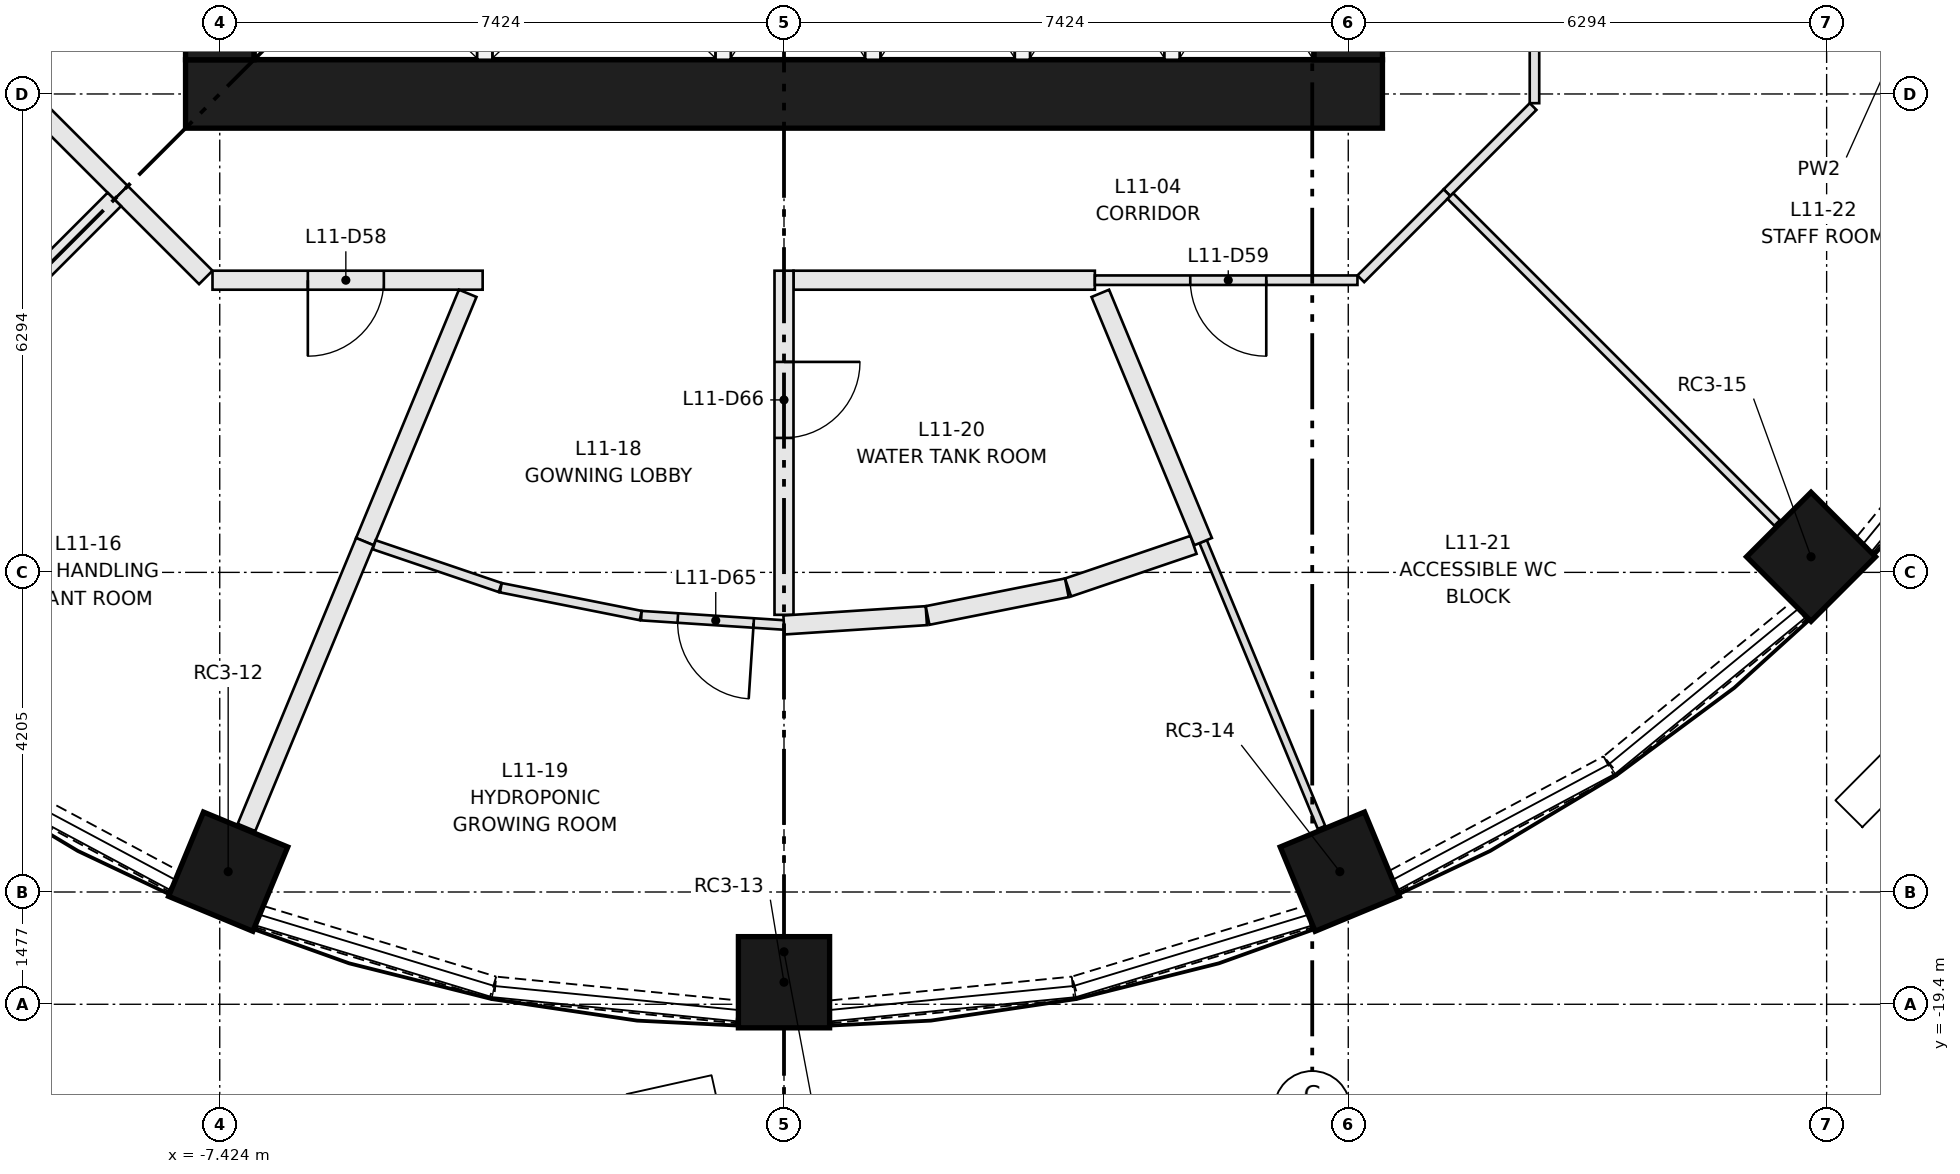
"""IFC4 building model, lengths in metres.
Left out: names, types, materials, properties, quantities, classifications, styles, units other than length and angle.
Written with IfcOpenShell. Run it as: python <this file> out.ifc"""

import sys

from ifc_helpers import new_model, si_unit, direction, frame, frame_2d, origin, origin_2d, place, context, subcontext, project, spatial, rectangle, extrude, element, fill, save


model = new_model("IFC4")
c1 = context("Model", 3, precision=1e-05, world=origin(), true_north=direction((0.0, 1.0)))
c2 = subcontext(c1, "Body", "Model", "MODEL_VIEW")
j1 = project(units=[si_unit("LENGTHUNIT", "METRE"), si_unit("PLANEANGLEUNIT", "RADIAN")], contexts=[c1])
p1 = place(None, origin())
s1 = spatial("IfcSite", under=j1, at=p1, CompositionType="ELEMENT")
p2 = place(p1, origin())
s2 = spatial("IfcBuilding", under=s1, at=p2, CompositionType="ELEMENT")
p3 = place(p2, frame((0.0, 0.0, 44.45)))
s3 = spatial("IfcBuildingStorey", under=s2, at=p3, CompositionType="ELEMENT", Elevation=44.45)
for number, where, z_axis, x_axis in (
    (1, (-7.313, -17.655, 0.0), (0.0, 0.0, 1.0), (-0.383, -0.924, 0.0)),
    (2, (0.0, -19.11, 0.0), (0.0, 0.0, 1.0), (0.0, -1.0, 0.0)),
    (3, (7.313, -17.655, 0.0), (0.0, 0.0, 1.0), (0.383, -0.924, 0.0)),
    (4, (13.513, -13.513, 0.0), (0.0, 0.0, 1.0), (0.707, -0.707, 0.0)),
):
    element("IfcColumn", number, at=place(p3, frame(where, z_axis=z_axis, x_axis=x_axis)), inside=s3, PredefinedType="COLUMN", context=c2, shape_type="SweptSolid", body=[
        extrude(rectangle(XDim=1.2, YDim=1.2, at=origin_2d()), origin(), (0.0, 0.0, 1.0), 3.65),
    ])
p4 = place(p3, frame((-7.874, -7.424, 0.0), z_axis=(0.0, 0.0, 1.0), x_axis=(1.0, 0.0, 0.0)))
e5 = element("IfcWall", 5, at=p4, inside=s3, PredefinedType="SHEAR", context=c2, shape_type="SweptSolid", body=[
    extrude(rectangle(XDim=15.748, YDim=0.9, at=frame_2d((7.874, 0.0))), origin(), (0.0, 0.0, 1.0), 3.65),
])
p5 = place(p3, frame((-7.424, -6.974, 0.0), z_axis=(0.0, 0.0, 1.0), x_axis=(0.0, 1.0, 0.0)))
e6 = element("IfcWall", 6, at=p5, inside=s3, PredefinedType="SHEAR", context=c2, shape_type="SweptSolid", body=[
    extrude(rectangle(XDim=13.948, YDim=0.9, at=frame_2d((6.974, 0.0))), origin(), (0.0, 0.0, 1.0), 3.65),
])
p6 = place(p5, frame((6.474, 0.0, 0.0)))
e7 = element("IfcOpeningElement", 7, at=p6, cuts=e6, PredefinedType="OPENING", context=c2, shape_type="SweptSolid", body=[
    extrude(rectangle(XDim=1.0, YDim=2.1, at=frame_2d((0.5, 1.05))), frame((0.0, 0.46, 0.0), z_axis=(0.0, -1.0, 0.0), x_axis=(1.0, 0.0, 0.0)), (0.0, 0.0, 1.0), 0.92),
])
p7 = place(p5, frame((3.35, 0.0, 0.0)))
e8 = element("IfcOpeningElement", 8, at=p7, cuts=e6, PredefinedType="OPENING", context=c2, shape_type="SweptSolid", body=[
    extrude(rectangle(XDim=1.8, YDim=2.1, at=frame_2d((0.9, 1.05))), frame((0.0, 0.46, 0.0), z_axis=(0.0, -1.0, 0.0), x_axis=(1.0, 0.0, 0.0)), (0.0, 0.0, 1.0), 0.92),
])
p8 = place(p5, frame((8.799, 0.0, 0.0)))
e9 = element("IfcOpeningElement", 9, at=p8, cuts=e6, PredefinedType="OPENING", context=c2, shape_type="SweptSolid", body=[
    extrude(rectangle(XDim=1.8, YDim=2.1, at=frame_2d((0.9, 1.05))), frame((0.0, 0.46, 0.0), z_axis=(0.0, -1.0, 0.0), x_axis=(1.0, 0.0, 0.0)), (0.0, 0.0, 1.0), 0.92),
])
p9 = place(p5, frame((11.974, 0.0, 0.0)))
e10 = element("IfcOpeningElement", 10, at=p9, cuts=e6, PredefinedType="OPENING", context=c2, shape_type="SweptSolid", body=[
    extrude(rectangle(XDim=1.0, YDim=2.1, at=frame_2d((0.5, 1.05))), frame((0.0, 0.46, 0.0), z_axis=(0.0, -1.0, 0.0), x_axis=(1.0, 0.0, 0.0)), (0.0, 0.0, 1.0), 0.92),
])
p10 = place(p3, frame((7.424, -6.974, 0.0), z_axis=(0.0, 0.0, 1.0), x_axis=(0.0, 1.0, 0.0)))
e11 = element("IfcWall", 11, at=p10, inside=s3, PredefinedType="SHEAR", context=c2, shape_type="SweptSolid", body=[
    extrude(rectangle(XDim=13.948, YDim=0.9, at=frame_2d((6.974, 0.0))), origin(), (0.0, 0.0, 1.0), 3.65),
])
p11 = place(p10, frame((6.474, 0.0, 0.0)))
e12 = element("IfcOpeningElement", 12, at=p11, cuts=e11, PredefinedType="OPENING", context=c2, shape_type="SweptSolid", body=[
    extrude(rectangle(XDim=1.0, YDim=2.1, at=frame_2d((0.5, 1.05))), frame((0.0, 0.46, 0.0), z_axis=(0.0, -1.0, 0.0), x_axis=(1.0, 0.0, 0.0)), (0.0, 0.0, 1.0), 0.92),
])
p12 = place(p10, frame((3.35, 0.0, 0.0)))
e13 = element("IfcOpeningElement", 13, at=p12, cuts=e11, PredefinedType="OPENING", context=c2, shape_type="SweptSolid", body=[
    extrude(rectangle(XDim=1.8, YDim=2.1, at=frame_2d((0.9, 1.05))), frame((0.0, 0.46, 0.0), z_axis=(0.0, -1.0, 0.0), x_axis=(1.0, 0.0, 0.0)), (0.0, 0.0, 1.0), 0.92),
])
p13 = place(p10, frame((8.799, 0.0, 0.0)))
e14 = element("IfcOpeningElement", 14, at=p13, cuts=e11, PredefinedType="OPENING", context=c2, shape_type="SweptSolid", body=[
    extrude(rectangle(XDim=1.8, YDim=2.1, at=frame_2d((0.9, 1.05))), frame((0.0, 0.46, 0.0), z_axis=(0.0, -1.0, 0.0), x_axis=(1.0, 0.0, 0.0)), (0.0, 0.0, 1.0), 0.92),
])
for number, where, z_axis, x_axis in (
    (15, (-3.937, -6.974, 0.0), (0.0, 0.0, 1.0), (0.0, 1.0, 0.0)),
    (16, (-0.8, -6.974, 0.0), (0.0, 0.0, 1.0), (0.0, 1.0, 0.0)),
    (17, (1.168, -6.974, 0.0), (0.0, 0.0, 1.0), (0.0, 1.0, 0.0)),
    (18, (3.137, -6.974, 0.0), (0.0, 0.0, 1.0), (0.0, 1.0, 0.0)),
    (19, (5.105, -6.974, 0.0), (0.0, 0.0, 1.0), (0.0, 1.0, 0.0)),
):
    element("IfcWall", number, at=place(p3, frame(where, z_axis=z_axis, x_axis=x_axis)), inside=s3, PredefinedType="PARTITIONING", context=c2, shape_type="SweptSolid", body=[
        extrude(rectangle(XDim=2.8, YDim=0.2, at=frame_2d((1.4, 0.0))), origin(), (0.0, 0.0, 1.0), 3.3),
    ])
p14 = place(p3, frame((-10.854, -16.27, 0.0), z_axis=(0.0, 0.0, 1.0), x_axis=(0.881981372243, -0.471284265614, 0.0)))
e20 = element("IfcWall", 20, at=p14, inside=s3, PredefinedType="SOLIDWALL", context=c2, shape_type="SweptSolid", body=[
    extrude(rectangle(XDim=3.204, YDim=0.3, at=frame_2d((1.602, 0.0))), origin(), (0.0, 0.0, 1.0), 0.9),
])
p15 = place(p3, frame((-6.895, -18.25, 0.0), z_axis=(0.0, 0.0, 1.0), x_axis=(0.956883225512, -0.290472877795, 0.0)))
e21 = element("IfcWall", 21, at=p15, inside=s3, PredefinedType="SOLIDWALL", context=c2, shape_type="SweptSolid", body=[
    extrude(rectangle(XDim=3.202, YDim=0.3, at=frame_2d((1.601, 0.0))), origin(), (0.0, 0.0, 1.0), 0.9),
])
for number, where, z_axis, x_axis in (
    (22, (-3.801, -19.186, 0.0), (0.0, 0.0, 1.0), (0.995, -0.098, 0.0)),
    (23, (0.613, -19.5, 0.0), (0.0, 0.0, 1.0), (0.995, 0.098, 0.0)),
):
    element("IfcWall", number, at=place(p3, frame(where, z_axis=z_axis, x_axis=x_axis)), inside=s3, PredefinedType="SOLIDWALL", context=c2, shape_type="SweptSolid", body=[
        extrude(rectangle(XDim=3.204, YDim=0.3, at=frame_2d((1.602, 0.0))), origin(), (0.0, 0.0, 1.0), 0.9),
    ])
p16 = place(p3, frame((3.83, -19.18, 0.0), z_axis=(0.0, 0.0, 1.0), x_axis=(0.956883225512, 0.290472877795, 0.0)))
e24 = element("IfcWall", 24, at=p16, inside=s3, PredefinedType="SOLIDWALL", context=c2, shape_type="SweptSolid", body=[
    extrude(rectangle(XDim=3.202, YDim=0.3, at=frame_2d((1.601, 0.0))), origin(), (0.0, 0.0, 1.0), 0.9),
])
p17 = place(p3, frame((8.028, -17.78, 0.0), z_axis=(0.0, 0.0, 1.0), x_axis=(0.881981372243, 0.471284265614, 0.0)))
e25 = element("IfcWall", 25, at=p17, inside=s3, PredefinedType="SOLIDWALL", context=c2, shape_type="SweptSolid", body=[
    extrude(rectangle(XDim=3.204, YDim=0.3, at=frame_2d((1.602, 0.0))), origin(), (0.0, 0.0, 1.0), 0.9),
])
for number, where, z_axis, x_axis in (
    (26, (10.879, -16.253, 0.0), (0.0, 0.0, 1.0), (0.773, 0.634, 0.0)),
    (27, (14.222, -13.354, 0.0), (0.0, 0.0, 1.0), (0.634, 0.773, 0.0)),
):
    element("IfcWall", number, at=place(p3, frame(where, z_axis=z_axis, x_axis=x_axis)), inside=s3, PredefinedType="SOLIDWALL", context=c2, shape_type="SweptSolid", body=[
        extrude(rectangle(XDim=3.202, YDim=0.3, at=frame_2d((1.601, 0.0))), origin(), (0.0, 0.0, 1.0), 0.9),
    ])
p18 = place(p3, frame((9.856, -7.589, 0.0), z_axis=(0.0, 0.0, 1.0), x_axis=(-0.70718294931, -0.707030604857, 0.0)))
e28 = element("IfcWall", 28, at=p18, inside=s3, PredefinedType="PARTITIONING", context=c2, shape_type="SweptSolid", body=[
    extrude(rectangle(XDim=1.603, YDim=0.125, at=frame_2d((0.801, 0.0))), origin(), (0.0, 0.0, 1.0), 3.3),
])
p19 = place(p3, frame((9.874, -4.09, 0.0), z_axis=(0.0, 0.0, 1.0), x_axis=(0.0, -1.0, 0.0)))
e29 = element("IfcWall", 29, at=p19, inside=s3, PredefinedType="PARTITIONING", context=c2, shape_type="SweptSolid", body=[
    extrude(rectangle(XDim=3.455, YDim=0.125, at=frame_2d((1.728, 0.0))), origin(), (0.0, 0.0, 1.0), 3.3),
])
p20 = place(p19, frame((1.2, 0.0, 0.0)))
e30 = element("IfcOpeningElement", 30, at=p20, cuts=e29, PredefinedType="OPENING", context=c2, shape_type="SweptSolid", body=[
    extrude(rectangle(XDim=1.0, YDim=2.1, at=frame_2d((0.5, 1.05))), frame((0.0, 0.073, 0.0), z_axis=(0.0, -1.0, 0.0), x_axis=(1.0, 0.0, 0.0)), (0.0, 0.0, 1.0), 0.145),
])
for number, where, z_axis, x_axis in (
    (31, (-8.722, -8.722, 0.0), (0.0, 0.0, 1.0), (-0.707, 0.707, 0.0)),
    (32, (-7.608, -9.837, 0.0), (0.0, 0.0, 1.0), (-0.707, 0.707, 0.0)),
):
    element("IfcWall", number, at=place(p3, frame(where, z_axis=z_axis, x_axis=x_axis)), inside=s3, PredefinedType="PARTITIONING", context=c2, shape_type="SweptSolid", body=[
        extrude(rectangle(XDim=1.577, YDim=0.25, at=frame_2d((0.788, 0.0))), origin(), (0.0, 0.0, 1.0), 3.3),
    ])
p21 = place(p3, frame((-3.965, -9.874, 0.0), z_axis=(0.0, 0.0, 1.0), x_axis=(-1.0, 0.0, 0.0)))
e33 = element("IfcWall", 33, at=p21, inside=s3, PredefinedType="PARTITIONING", context=c2, shape_type="SweptSolid", body=[
    extrude(rectangle(XDim=3.554, YDim=0.25, at=frame_2d((1.777, 0.0))), origin(), (0.0, 0.0, 1.0), 3.3),
])
p22 = place(p21, frame((1.3, 0.0, 0.0)))
e34 = element("IfcOpeningElement", 34, at=p22, cuts=e33, PredefinedType="OPENING", context=c2, shape_type="SweptSolid", body=[
    extrude(rectangle(XDim=1.0, YDim=2.1, at=frame_2d((0.5, 1.05))), frame((0.0, 0.135, 0.0), z_axis=(0.0, -1.0, 0.0), x_axis=(1.0, 0.0, 0.0)), (0.0, 0.0, 1.0), 0.27),
])
p23 = place(p3, frame((4.09, -9.874, 0.0), z_axis=(0.0, 0.0, 1.0), x_axis=(-1.0, 0.0, 0.0)))
e35 = element("IfcWall", 35, at=p23, inside=s3, PredefinedType="PARTITIONING", context=c2, shape_type="SweptSolid", body=[
    extrude(rectangle(XDim=3.965, YDim=0.25, at=frame_2d((1.982, 0.0))), origin(), (0.0, 0.0, 1.0), 3.3),
])
p24 = place(p3, frame((7.545, -9.874, 0.0), z_axis=(0.0, 0.0, 1.0), x_axis=(-1.0, 0.0, 0.0)))
e36 = element("IfcWall", 36, at=p24, inside=s3, PredefinedType="PARTITIONING", context=c2, shape_type="SweptSolid", body=[
    extrude(rectangle(XDim=3.455, YDim=0.125, at=frame_2d((1.728, 0.0))), origin(), (0.0, 0.0, 1.0), 3.3),
])
p25 = place(p24, frame((1.2, 0.0, 0.0)))
e37 = element("IfcOpeningElement", 37, at=p25, cuts=e36, PredefinedType="OPENING", context=c2, shape_type="SweptSolid", body=[
    extrude(rectangle(XDim=1.0, YDim=2.1, at=frame_2d((0.5, 1.05))), frame((0.0, 0.073, 0.0), z_axis=(0.0, -1.0, 0.0), x_axis=(1.0, 0.0, 0.0)), (0.0, 0.0, 1.0), 0.145),
])
p26 = place(p3, frame((8.722, -8.722, 0.0), z_axis=(0.0, 0.0, 1.0), x_axis=(-0.707030604857, -0.70718294931, 0.0)))
e38 = element("IfcWall", 38, at=p26, inside=s3, PredefinedType="PARTITIONING", context=c2, shape_type="SweptSolid", body=[
    extrude(rectangle(XDim=1.603, YDim=0.125, at=frame_2d((0.801, 0.0))), origin(), (0.0, 0.0, 1.0), 3.3),
])
p27 = place(p3, frame((17.073, -7.072, 0.0), z_axis=(0.0, 0.0, 1.0), x_axis=(-0.92387920118, 0.382684232268, 0.0)))
e39 = element("IfcWall", 39, at=p27, inside=s3, PredefinedType="PARTITIONING", context=c2, shape_type="SweptSolid", body=[
    extrude(rectangle(XDim=4.67, YDim=0.11, at=frame_2d((2.335, 0.0))), origin(), (0.0, 0.0, 1.0), 3.3),
])
p28 = place(p3, frame((-13.067, -13.067, 0.0), z_axis=(0.0, 0.0, 1.0), x_axis=(0.707106781187, 0.707106781187, 0.0)))
e40 = element("IfcWall", 40, at=p28, inside=s3, PredefinedType="PARTITIONING", context=c2, shape_type="SweptSolid", body=[
    extrude(rectangle(XDim=6.02, YDim=0.25, at=frame_2d((3.01, 0.0))), origin(), (0.0, 0.0, 1.0), 3.3),
])
p29 = place(p3, frame((-4.162, -10.047, 0.0), z_axis=(0.0, 0.0, 1.0), x_axis=(-0.382662857696, -0.92388805455, 0.0)))
e41 = element("IfcWall", 41, at=p29, inside=s3, PredefinedType="PARTITIONING", context=c2, shape_type="SweptSolid", body=[
    extrude(rectangle(XDim=3.535, YDim=0.25, at=frame_2d((1.768, 0.0))), origin(), (0.0, 0.0, 1.0), 3.3),
])
p30 = place(p3, frame((-5.514, -13.313, 0.0), z_axis=(0.0, 0.0, 1.0), x_axis=(-0.382697907061, -0.923873536763, 0.0)))
e42 = element("IfcWall", 42, at=p30, inside=s3, PredefinedType="PARTITIONING", context=c2, shape_type="SweptSolid", body=[
    extrude(rectangle(XDim=4.07, YDim=0.25, at=frame_2d((2.035, 0.0))), origin(), (0.0, 0.0, 1.0), 3.3),
])
p31 = place(p3, frame((-3.733, -13.918, 0.0), z_axis=(0.0, 0.0, 1.0), x_axis=(-0.946926428718, 0.321450367234, 0.0)))
e43 = element("IfcWall", 43, at=p31, inside=s3, PredefinedType="PARTITIONING", context=c2, shape_type="SweptSolid", body=[
    extrude(rectangle(XDim=1.751, YDim=0.125, at=frame_2d((0.876, 0.0))), origin(), (0.0, 0.0, 1.0), 3.3),
])
p32 = place(p3, frame((-1.885, -14.286, 0.0), z_axis=(0.0, 0.0, 1.0), x_axis=(-0.980800221705, 0.19501519198, 0.0)))
e44 = element("IfcWall", 44, at=p32, inside=s3, PredefinedType="PARTITIONING", context=c2, shape_type="SweptSolid", body=[
    extrude(rectangle(XDim=1.877, YDim=0.125, at=frame_2d((0.938, 0.0))), origin(), (0.0, 0.0, 1.0), 3.3),
])
p33 = place(p3, frame((0.0, -14.41, 0.0), z_axis=(0.0, 0.0, 1.0), x_axis=(-0.997865971163, 0.065295509756, 0.0)))
e45 = element("IfcWall", 45, at=p33, inside=s3, PredefinedType="PARTITIONING", context=c2, shape_type="SweptSolid", body=[
    extrude(rectangle(XDim=1.881, YDim=0.125, at=frame_2d((0.94, 0.0))), origin(), (0.0, 0.0, 1.0), 3.3),
])
p34 = place(p33, frame((0.4, 0.0, 0.0)))
e46 = element("IfcOpeningElement", 46, at=p34, cuts=e45, PredefinedType="OPENING", context=c2, shape_type="SweptSolid", body=[
    extrude(rectangle(XDim=1.0, YDim=2.1, at=frame_2d((0.5, 1.05))), frame((0.0, 0.073, 0.0), z_axis=(0.0, -1.0, 0.0), x_axis=(1.0, 0.0, 0.0)), (0.0, 0.0, 1.0), 0.145),
])
p35 = place(p3, frame((0.0, -9.749, 0.0), z_axis=(0.0, 0.0, 1.0), x_axis=(0.0, -1.0, 0.0)))
e47 = element("IfcWall", 47, at=p35, inside=s3, PredefinedType="PARTITIONING", context=c2, shape_type="SweptSolid", body=[
    extrude(rectangle(XDim=4.528, YDim=0.25, at=frame_2d((2.264, 0.0))), origin(), (0.0, 0.0, 1.0), 3.3),
])
p36 = place(p35, frame((1.2, 0.0, 0.0)))
e48 = element("IfcOpeningElement", 48, at=p36, cuts=e47, PredefinedType="OPENING", context=c2, shape_type="SweptSolid", body=[
    extrude(rectangle(XDim=1.0, YDim=2.1, at=frame_2d((0.5, 1.05))), frame((0.0, 0.135, 0.0), z_axis=(0.0, -1.0, 0.0), x_axis=(1.0, 0.0, 0.0)), (0.0, 0.0, 1.0), 0.27),
])
p37 = place(p3, frame((0.0, -14.41, 0.0), z_axis=(0.0, 0.0, 1.0), x_axis=(0.997857088285, 0.065431119203, 0.0)))
e49 = element("IfcWall", 49, at=p37, inside=s3, PredefinedType="PARTITIONING", context=c2, shape_type="SweptSolid", body=[
    extrude(rectangle(XDim=1.877, YDim=0.25, at=frame_2d((0.938, 0.0))), origin(), (0.0, 0.0, 1.0), 3.3),
])
p38 = place(p3, frame((1.889, -14.285, 0.0), z_axis=(0.0, 0.0, 1.0), x_axis=(0.980791158232, 0.195060769847, 0.0)))
e50 = element("IfcWall", 50, at=p38, inside=s3, PredefinedType="PARTITIONING", context=c2, shape_type="SweptSolid", body=[
    extrude(rectangle(XDim=1.869, YDim=0.25, at=frame_2d((0.934, 0.0))), origin(), (0.0, 0.0, 1.0), 3.3),
])
p39 = place(p3, frame((3.737, -13.917, 0.0), z_axis=(0.0, 0.0, 1.0), x_axis=(0.946889634804, 0.321558734138, 0.0)))
e51 = element("IfcWall", 51, at=p39, inside=s3, PredefinedType="PARTITIONING", context=c2, shape_type="SweptSolid", body=[
    extrude(rectangle(XDim=1.743, YDim=0.25, at=frame_2d((0.872, 0.0))), origin(), (0.0, 0.0, 1.0), 3.3),
])
p40 = place(p3, frame((5.514, -13.313, 0.0), z_axis=(0.0, 0.0, 1.0), x_axis=(0.382697907061, -0.923873536763, 0.0)))
e52 = element("IfcWall", 52, at=p40, inside=s3, PredefinedType="PARTITIONING", context=c2, shape_type="SweptSolid", body=[
    extrude(rectangle(XDim=4.07, YDim=0.105, at=frame_2d((2.035, 0.0))), origin(), (0.0, 0.0, 1.0), 3.3),
])
p41 = place(p3, frame((4.162, -10.047, 0.0), z_axis=(0.0, 0.0, 1.0), x_axis=(0.382662857696, -0.92388805455, 0.0)))
e53 = element("IfcWall", 53, at=p41, inside=s3, PredefinedType="PARTITIONING", context=c2, shape_type="SweptSolid", body=[
    extrude(rectangle(XDim=3.535, YDim=0.25, at=frame_2d((1.768, 0.0))), origin(), (0.0, 0.0, 1.0), 3.3),
])
p42 = place(p3, frame((8.767, -8.767, 0.0), z_axis=(0.0, 0.0, 1.0), x_axis=(0.707106781187, -0.707106781187, 0.0)))
e54 = element("IfcWall", 54, at=p42, inside=s3, PredefinedType="PARTITIONING", context=c2, shape_type="SweptSolid", body=[
    extrude(rectangle(XDim=6.082, YDim=0.105, at=frame_2d((3.041, 0.0))), origin(), (0.0, 0.0, 1.0), 3.3),
])
p43 = place(p22, origin())
e55 = element("IfcDoor", 55, at=p43, inside=s3, OperationType="SINGLE_SWING_RIGHT", PredefinedType="DOOR", context=c2, shape_type="SweptSolid", body=[
    extrude(rectangle(XDim=1.0, YDim=2.1, at=frame_2d((0.5, 1.05))), frame((0.0, 0.025, 0.0), z_axis=(0.0, -1.0, 0.0), x_axis=(1.0, 0.0, 0.0)), (0.0, 0.0, 1.0), 0.05),
])
fill(e34, e55)
p44 = place(p25, origin())
e56 = element("IfcDoor", 56, at=p44, inside=s3, OperationType="SINGLE_SWING_LEFT", PredefinedType="DOOR", context=c2, shape_type="SweptSolid", body=[
    extrude(rectangle(XDim=1.0, YDim=2.1, at=frame_2d((0.5, 1.05))), frame((0.0, 0.025, 0.0), z_axis=(0.0, -1.0, 0.0), x_axis=(1.0, 0.0, 0.0)), (0.0, 0.0, 1.0), 0.05),
])
fill(e37, e56)
p45 = place(p34, origin())
e57 = element("IfcDoor", 57, at=p45, inside=s3, OperationType="SINGLE_SWING_LEFT", PredefinedType="DOOR", context=c2, shape_type="SweptSolid", body=[
    extrude(rectangle(XDim=1.0, YDim=2.1, at=frame_2d((0.5, 1.05))), frame((0.0, 0.025, 0.0), z_axis=(0.0, -1.0, 0.0), x_axis=(1.0, 0.0, 0.0)), (0.0, 0.0, 1.0), 0.05),
])
fill(e46, e57)
p46 = place(p36, origin())
e58 = element("IfcDoor", 58, at=p46, inside=s3, OperationType="SINGLE_SWING_LEFT", PredefinedType="DOOR", context=c2, shape_type="SweptSolid", body=[
    extrude(rectangle(XDim=1.0, YDim=2.1, at=frame_2d((0.5, 1.05))), frame((0.0, 0.025, 0.0), z_axis=(0.0, -1.0, 0.0), x_axis=(1.0, 0.0, 0.0)), (0.0, 0.0, 1.0), 0.05),
])
fill(e48, e58)
save(model, sys.argv[1])
